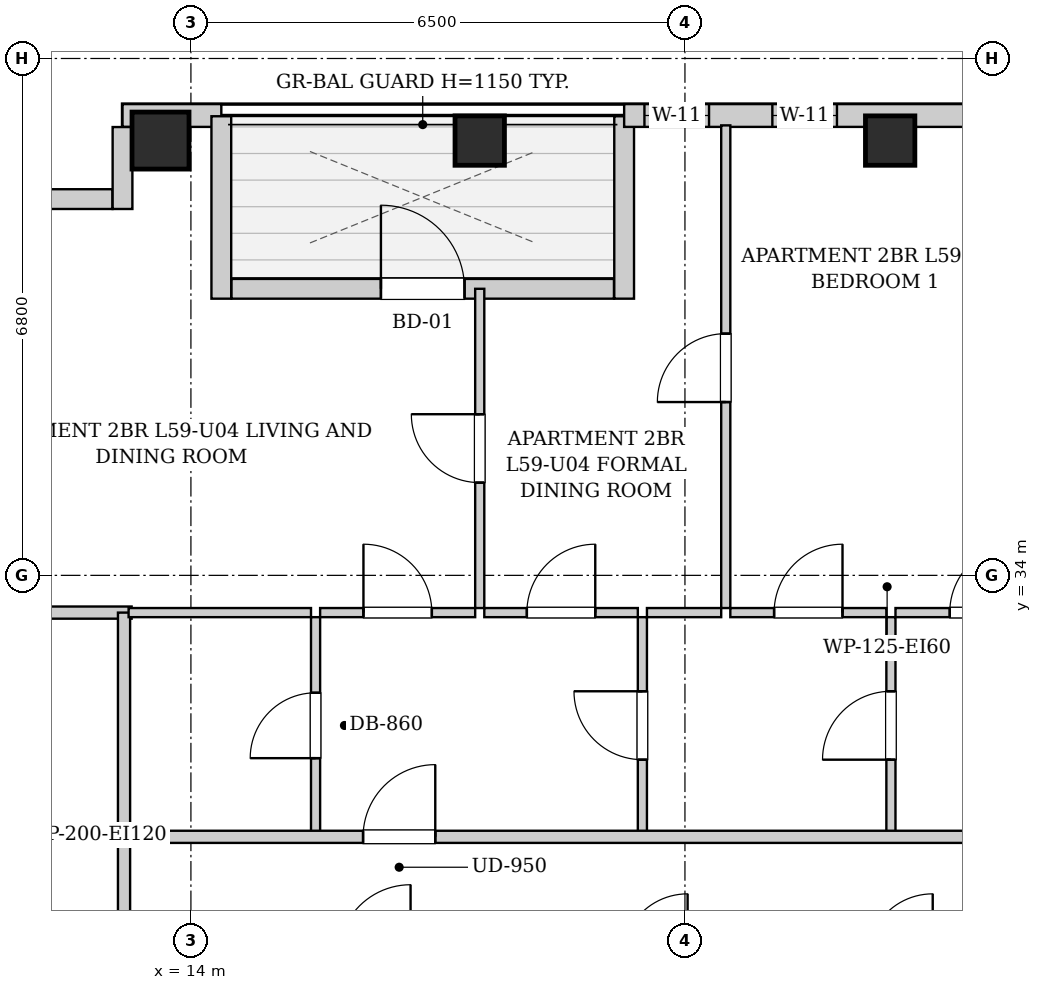
"""IFC4 building model, lengths in metres.
Left out: names, types, materials, properties, quantities, classifications, styles, units other than length and angle.
Written with IfcOpenShell. Run it as: python <this file> out.ifc"""

import sys

from ifc_helpers import new_model, si_unit, direction, frame, frame_2d, origin, origin_2d, place, context, subcontext, project, spatial, rectangle, extrude, element, fill, save


model = new_model("IFC4")
c1 = context("Model", 3, precision=1e-05, world=origin(), true_north=direction((0.0, 1.0)))
c2 = subcontext(c1, "Body", "Model", "MODEL_VIEW")
j1 = project(units=[si_unit("LENGTHUNIT", "METRE"), si_unit("PLANEANGLEUNIT", "RADIAN")], contexts=[c1])
p1 = place(None, origin())
s1 = spatial("IfcSite", under=j1, at=p1, CompositionType="ELEMENT")
p2 = place(p1, origin())
s2 = spatial("IfcBuilding", under=s1, at=p2, CompositionType="ELEMENT")
p3 = place(p2, frame((0.0, 0.0, 204.1)))
s3 = spatial("IfcBuildingStorey", under=s2, at=p3, CompositionType="ELEMENT", Elevation=204.1)
p4 = place(p3, frame((13.6, 39.72, 0.0), z_axis=(0.0, 0.0, 1.0), x_axis=(1.0, 0.0, 0.0)))
e1 = element("IfcColumn", 1, at=p4, inside=s3, PredefinedType="COLUMN", context=c2, shape_type="SweptSolid", body=[
    extrude(rectangle(XDim=0.75, YDim=0.75, at=origin_2d()), origin(), (0.0, 0.0, 1.0), 3.3),
])
for number, where, z_axis, x_axis in (
    (2, (17.8, 39.72, 0.0), (0.0, 0.0, 1.0), (1.0, 0.0, 0.0)),
    (3, (23.2, 39.72, 0.0), (0.0, 0.0, 1.0), (1.0, 0.0, 0.0)),
):
    element("IfcColumn", number, at=place(p3, frame(where, z_axis=z_axis, x_axis=x_axis)), inside=s3, PredefinedType="COLUMN", context=c2, shape_type="SweptSolid", body=[
        extrude(rectangle(XDim=0.65, YDim=0.65, at=origin_2d()), origin(), (0.0, 0.0, 1.0), 3.3),
    ])
p5 = place(p3, frame((13.1, 40.05, 0.0), z_axis=(0.0, 0.0, 1.0), x_axis=(1.0, 0.0, 0.0)))
e4 = element("IfcWall", 4, at=p5, inside=s3, PredefinedType="SOLIDWALL", context=c2, shape_type="SweptSolid", body=[
    extrude(rectangle(XDim=1.3, YDim=0.3, at=frame_2d((0.65, 0.0))), origin(), (0.0, 0.0, 1.0), 3.04),
])
p6 = place(p3, frame((14.4, 40.04, 0.0), z_axis=(0.0, 0.0, 1.0), x_axis=(0.0, -1.0, 0.0)))
e5 = element("IfcWall", 5, at=p6, inside=s3, PredefinedType="SOLIDWALL", context=c2, shape_type="SweptSolid", body=[
    extrude(rectangle(XDim=2.4, YDim=0.26, at=frame_2d((1.2, 0.0))), origin(), (0.0, 0.0, 1.0), 3.04),
])
p7 = place(p3, frame((14.534, 37.77, 0.0), z_axis=(0.0, 0.0, 1.0), x_axis=(1.0, 0.0, 0.0)))
e6 = element("IfcWall", 6, at=p7, inside=s3, PredefinedType="SOLIDWALL", context=c2, shape_type="SweptSolid", body=[
    extrude(rectangle(XDim=5.032, YDim=0.26, at=frame_2d((2.516, 0.0))), origin(), (0.0, 0.0, 1.0), 3.04),
])
p8 = place(p7, frame((1.966, 0.0, 0.0)))
e7 = element("IfcOpeningElement", 7, at=p8, cuts=e6, PredefinedType="OPENING", context=c2, shape_type="SweptSolid", body=[
    extrude(rectangle(XDim=1.1, YDim=2.0, at=frame_2d((0.55, 1.0))), frame((0.0, 0.14, 0.0), z_axis=(0.0, -1.0, 0.0), x_axis=(1.0, 0.0, 0.0)), (0.0, 0.0, 1.0), 0.28),
])
p9 = place(p3, frame((19.7, 37.64, 0.0), z_axis=(0.0, 0.0, 1.0), x_axis=(0.0, 1.0, 0.0)))
e8 = element("IfcWall", 8, at=p9, inside=s3, PredefinedType="SOLIDWALL", context=c2, shape_type="SweptSolid", body=[
    extrude(rectangle(XDim=2.4, YDim=0.26, at=frame_2d((1.2, 0.0))), origin(), (0.0, 0.0, 1.0), 3.04),
])
p10 = place(p3, frame((19.7, 40.05, 0.0), z_axis=(0.0, 0.0, 1.0), x_axis=(1.0, 0.0, 0.0)))
e9 = element("IfcWall", 9, at=p10, inside=s3, PredefinedType="SOLIDWALL", context=c2, shape_type="SweptSolid", body=[
    extrude(rectangle(XDim=11.55, YDim=0.3, at=frame_2d((5.775, 0.0))), origin(), (0.0, 0.0, 1.0), 3.04),
])
p11 = place(p10, frame((0.267, 0.0, 0.55)))
e10 = element("IfcOpeningElement", 10, at=p11, cuts=e9, PredefinedType="OPENING", context=c2, shape_type="SweptSolid", body=[
    extrude(rectangle(XDim=0.85, YDim=1.2, at=frame_2d((0.425, 0.6))), frame((0.0, 0.16, 0.0), z_axis=(0.0, -1.0, 0.0), x_axis=(1.0, 0.0, 0.0)), (0.0, 0.0, 1.0), 0.32),
])
p12 = place(p10, frame((1.95, 0.0, 0.55)))
e11 = element("IfcOpeningElement", 11, at=p12, cuts=e9, PredefinedType="OPENING", context=c2, shape_type="SweptSolid", body=[
    extrude(rectangle(XDim=0.85, YDim=1.2, at=frame_2d((0.425, 0.6))), frame((0.0, 0.16, 0.0), z_axis=(0.0, -1.0, 0.0), x_axis=(1.0, 0.0, 0.0)), (0.0, 0.0, 1.0), 0.32),
])
p13 = place(p10, frame((7.8, 0.0, 0.55)))
e12 = element("IfcOpeningElement", 12, at=p13, cuts=e9, PredefinedType="OPENING", context=c2, shape_type="SweptSolid", body=[
    extrude(rectangle(XDim=1.35, YDim=1.2, at=frame_2d((0.675, 0.6))), frame((0.0, 0.16, 0.0), z_axis=(0.0, -1.0, 0.0), x_axis=(1.0, 0.0, 0.0)), (0.0, 0.0, 1.0), 0.32),
])
p14 = place(p3, frame((11.982, 38.95, 0.0), z_axis=(0.0, 0.0, 1.0), x_axis=(1.0, 0.0, 0.0)))
e13 = element("IfcWall", 13, at=p14, inside=s3, PredefinedType="SOLIDWALL", context=c2, shape_type="SweptSolid", body=[
    extrude(rectangle(XDim=0.986, YDim=0.26, at=frame_2d((0.493, 0.0))), origin(), (0.0, 0.0, 1.0), 3.04),
])
p15 = place(p3, frame((13.1, 38.82, 0.0), z_axis=(0.0, 0.0, 1.0), x_axis=(0.0, 1.0, 0.0)))
e14 = element("IfcWall", 14, at=p15, inside=s3, PredefinedType="SOLIDWALL", context=c2, shape_type="SweptSolid", body=[
    extrude(rectangle(XDim=1.078, YDim=0.26, at=frame_2d((0.539, 0.0))), origin(), (0.0, 0.0, 1.0), 3.04),
])
p16 = place(p3, frame((13.12, 28.98, 0.0), z_axis=(0.0, 0.0, 1.0), x_axis=(0.0, 1.0, 0.0)))
e15 = element("IfcWall", 15, at=p16, inside=s3, PredefinedType="PARTITIONING", context=c2, shape_type="SweptSolid", body=[
    extrude(rectangle(XDim=1.58, YDim=0.16, at=frame_2d((0.79, 0.0))), origin(), (0.0, 0.0, 1.0), 3.04),
])
p17 = place(p3, frame((10.88, 33.51, 0.0), z_axis=(0.0, 0.0, 1.0), x_axis=(1.0, 0.0, 0.0)))
e16 = element("IfcWall", 16, at=p17, inside=s3, PredefinedType="PARTITIONING", context=c2, shape_type="SweptSolid", body=[
    extrude(rectangle(XDim=2.34, YDim=0.16, at=frame_2d((1.17, 0.0))), origin(), (0.0, 0.0, 1.0), 3.04),
])
p18 = place(p3, frame((13.12, 30.6, 0.0), z_axis=(0.0, 0.0, 1.0), x_axis=(0.0, 1.0, 0.0)))
e17 = element("IfcWall", 17, at=p18, inside=s3, PredefinedType="PARTITIONING", context=c2, shape_type="SweptSolid", body=[
    extrude(rectangle(XDim=2.91, YDim=0.16, at=frame_2d((1.455, 0.0))), origin(), (0.0, 0.0, 1.0), 3.04),
])
p19 = place(p3, frame((15.64, 30.6, 0.0), z_axis=(0.0, 0.0, 1.0), x_axis=(0.0, 1.0, 0.0)))
e18 = element("IfcWall", 18, at=p19, inside=s3, PredefinedType="PARTITIONING", context=c2, shape_type="SweptSolid", body=[
    extrude(rectangle(XDim=2.85, YDim=0.12, at=frame_2d((1.425, 0.0))), origin(), (0.0, 0.0, 1.0), 3.04),
])
p20 = place(p19, frame((0.995, 0.0, 0.0)))
e19 = element("IfcOpeningElement", 19, at=p20, cuts=e18, PredefinedType="OPENING", context=c2, shape_type="SweptSolid", body=[
    extrude(rectangle(XDim=0.86, YDim=2.05, at=frame_2d((0.43, 1.025))), frame((0.0, 0.07, 0.0), z_axis=(0.0, -1.0, 0.0), x_axis=(1.0, 0.0, 0.0)), (0.0, 0.0, 1.0), 0.14),
])
p21 = place(p3, frame((13.18, 33.51, 0.0), z_axis=(0.0, 0.0, 1.0), x_axis=(1.0, 0.0, 0.0)))
e20 = element("IfcWall", 20, at=p21, inside=s3, PredefinedType="PARTITIONING", context=c2, shape_type="SweptSolid", body=[
    extrude(rectangle(XDim=2.4, YDim=0.12, at=frame_2d((1.2, 0.0))), origin(), (0.0, 0.0, 1.0), 3.04),
])
p22 = place(p3, frame((19.94, 30.6, 0.0), z_axis=(0.0, 0.0, 1.0), x_axis=(0.0, 1.0, 0.0)))
e21 = element("IfcWall", 21, at=p22, inside=s3, PredefinedType="PARTITIONING", context=c2, shape_type="SweptSolid", body=[
    extrude(rectangle(XDim=2.85, YDim=0.12, at=frame_2d((1.425, 0.0))), origin(), (0.0, 0.0, 1.0), 3.04),
])
p23 = place(p22, frame((0.975, 0.0, 0.0)))
e22 = element("IfcOpeningElement", 22, at=p23, cuts=e21, PredefinedType="OPENING", context=c2, shape_type="SweptSolid", body=[
    extrude(rectangle(XDim=0.9, YDim=2.05, at=frame_2d((0.45, 1.025))), frame((0.0, 0.07, 0.0), z_axis=(0.0, -1.0, 0.0), x_axis=(1.0, 0.0, 0.0)), (0.0, 0.0, 1.0), 0.14),
])
p24 = place(p3, frame((15.7, 33.51, 0.0), z_axis=(0.0, 0.0, 1.0), x_axis=(1.0, 0.0, 0.0)))
e23 = element("IfcWall", 23, at=p24, inside=s3, PredefinedType="PARTITIONING", context=c2, shape_type="SweptSolid", body=[
    extrude(rectangle(XDim=2.04, YDim=0.12, at=frame_2d((1.02, 0.0))), origin(), (0.0, 0.0, 1.0), 3.04),
])
p25 = place(p24, frame((0.57, 0.0, 0.0)))
e24 = element("IfcOpeningElement", 24, at=p25, cuts=e23, PredefinedType="OPENING", context=c2, shape_type="SweptSolid", body=[
    extrude(rectangle(XDim=0.9, YDim=2.05, at=frame_2d((0.45, 1.025))), frame((0.0, 0.07, 0.0), z_axis=(0.0, -1.0, 0.0), x_axis=(1.0, 0.0, 0.0)), (0.0, 0.0, 1.0), 0.14),
])
p26 = place(p3, frame((17.86, 33.51, 0.0), z_axis=(0.0, 0.0, 1.0), x_axis=(1.0, 0.0, 0.0)))
e25 = element("IfcWall", 25, at=p26, inside=s3, PredefinedType="PARTITIONING", context=c2, shape_type="SweptSolid", body=[
    extrude(rectangle(XDim=2.02, YDim=0.12, at=frame_2d((1.01, 0.0))), origin(), (0.0, 0.0, 1.0), 3.04),
])
p27 = place(p26, frame((0.56, 0.0, 0.0)))
e26 = element("IfcOpeningElement", 26, at=p27, cuts=e25, PredefinedType="OPENING", context=c2, shape_type="SweptSolid", body=[
    extrude(rectangle(XDim=0.9, YDim=2.05, at=frame_2d((0.45, 1.025))), frame((0.0, 0.07, 0.0), z_axis=(0.0, -1.0, 0.0), x_axis=(1.0, 0.0, 0.0)), (0.0, 0.0, 1.0), 0.14),
])
p28 = place(p3, frame((23.21, 30.6, 0.0), z_axis=(0.0, 0.0, 1.0), x_axis=(0.0, 1.0, 0.0)))
e27 = element("IfcWall", 27, at=p28, inside=s3, PredefinedType="PARTITIONING", context=c2, shape_type="SweptSolid", body=[
    extrude(rectangle(XDim=2.85, YDim=0.12, at=frame_2d((1.425, 0.0))), origin(), (0.0, 0.0, 1.0), 3.04),
])
p29 = place(p28, frame((0.975, 0.0, 0.0)))
e28 = element("IfcOpeningElement", 28, at=p29, cuts=e27, PredefinedType="OPENING", context=c2, shape_type="SweptSolid", body=[
    extrude(rectangle(XDim=0.9, YDim=2.05, at=frame_2d((0.45, 1.025))), frame((0.0, 0.07, 0.0), z_axis=(0.0, -1.0, 0.0), x_axis=(1.0, 0.0, 0.0)), (0.0, 0.0, 1.0), 0.14),
])
p30 = place(p3, frame((20.0, 33.51, 0.0), z_axis=(0.0, 0.0, 1.0), x_axis=(1.0, 0.0, 0.0)))
e29 = element("IfcWall", 29, at=p30, inside=s3, PredefinedType="PARTITIONING", context=c2, shape_type="SweptSolid", body=[
    extrude(rectangle(XDim=0.977, YDim=0.12, at=frame_2d((0.489, 0.0))), origin(), (0.0, 0.0, 1.0), 3.04),
])
p31 = place(p3, frame((21.097, 33.51, 0.0), z_axis=(0.0, 0.0, 1.0), x_axis=(1.0, 0.0, 0.0)))
e30 = element("IfcWall", 30, at=p31, inside=s3, PredefinedType="PARTITIONING", context=c2, shape_type="SweptSolid", body=[
    extrude(rectangle(XDim=2.053, YDim=0.12, at=frame_2d((1.026, 0.0))), origin(), (0.0, 0.0, 1.0), 3.04),
])
p32 = place(p31, frame((0.576, 0.0, 0.0)))
e31 = element("IfcOpeningElement", 31, at=p32, cuts=e30, PredefinedType="OPENING", context=c2, shape_type="SweptSolid", body=[
    extrude(rectangle(XDim=0.9, YDim=2.05, at=frame_2d((0.45, 1.025))), frame((0.0, 0.07, 0.0), z_axis=(0.0, -1.0, 0.0), x_axis=(1.0, 0.0, 0.0)), (0.0, 0.0, 1.0), 0.14),
])
p33 = place(p3, frame((23.27, 33.51, 0.0), z_axis=(0.0, 0.0, 1.0), x_axis=(1.0, 0.0, 0.0)))
e32 = element("IfcWall", 32, at=p33, inside=s3, PredefinedType="PARTITIONING", context=c2, shape_type="SweptSolid", body=[
    extrude(rectangle(XDim=2.327, YDim=0.12, at=frame_2d((1.164, 0.0))), origin(), (0.0, 0.0, 1.0), 3.04),
])
p34 = place(p33, frame((0.714, 0.0, 0.0)))
e33 = element("IfcOpeningElement", 33, at=p34, cuts=e32, PredefinedType="OPENING", context=c2, shape_type="SweptSolid", body=[
    extrude(rectangle(XDim=0.9, YDim=2.05, at=frame_2d((0.45, 1.025))), frame((0.0, 0.07, 0.0), z_axis=(0.0, -1.0, 0.0), x_axis=(1.0, 0.0, 0.0)), (0.0, 0.0, 1.0), 0.14),
])
p35 = place(p3, frame((17.8, 33.57, 0.0), z_axis=(0.0, 0.0, 1.0), x_axis=(0.0, 1.0, 0.0)))
e34 = element("IfcWall", 34, at=p35, inside=s3, PredefinedType="PARTITIONING", context=c2, shape_type="SweptSolid", body=[
    extrude(rectangle(XDim=4.2, YDim=0.12, at=frame_2d((2.1, 0.0))), origin(), (0.0, 0.0, 1.0), 2.556),
])
p36 = place(p35, frame((1.65, 0.0, 0.0)))
e35 = element("IfcOpeningElement", 35, at=p36, cuts=e34, PredefinedType="OPENING", context=c2, shape_type="SweptSolid", body=[
    extrude(rectangle(XDim=0.9, YDim=2.05, at=frame_2d((0.45, 1.025))), frame((0.0, 0.07, 0.0), z_axis=(0.0, -1.0, 0.0), x_axis=(1.0, 0.0, 0.0)), (0.0, 0.0, 1.0), 0.14),
])
p37 = place(p3, frame((21.037, 33.57, 0.0), z_axis=(0.0, 0.0, 1.0), x_axis=(0.0, 1.0, 0.0)))
e36 = element("IfcWall", 36, at=p37, inside=s3, PredefinedType="PARTITIONING", context=c2, shape_type="SweptSolid", body=[
    extrude(rectangle(XDim=6.35, YDim=0.12, at=frame_2d((3.175, 0.0))), origin(), (0.0, 0.0, 1.0), 3.04),
])
p38 = place(p37, frame((2.71, 0.0, 0.0)))
e37 = element("IfcOpeningElement", 37, at=p38, cuts=e36, PredefinedType="OPENING", context=c2, shape_type="SweptSolid", body=[
    extrude(rectangle(XDim=0.9, YDim=2.05, at=frame_2d((0.45, 1.025))), frame((0.0, 0.07, 0.0), z_axis=(0.0, -1.0, 0.0), x_axis=(1.0, 0.0, 0.0)), (0.0, 0.0, 1.0), 0.14),
])
p39 = place(p3, frame((13.15, 30.56, 0.0), z_axis=(0.0, 0.0, 1.0), x_axis=(1.0, 0.0, 0.0)))
e38 = element("IfcWall", 38, at=p39, inside=s3, PredefinedType="PARTITIONING", context=c2, shape_type="SweptSolid", body=[
    extrude(rectangle(XDim=24.6, YDim=0.16, at=frame_2d((12.3, 0.0))), origin(), (0.0, 0.0, 1.0), 3.04),
])
p40 = place(p39, frame((3.115, 0.0, 0.0)))
e39 = element("IfcOpeningElement", 39, at=p40, cuts=e38, PredefinedType="OPENING", context=c2, shape_type="SweptSolid", body=[
    extrude(rectangle(XDim=0.95, YDim=2.1, at=frame_2d((0.475, 1.05))), frame((0.0, 0.09, 0.0), z_axis=(0.0, -1.0, 0.0), x_axis=(1.0, 0.0, 0.0)), (0.0, 0.0, 1.0), 0.18),
])
p41 = place(p39, frame((21.55, 0.0, 0.0)))
e40 = element("IfcOpeningElement", 40, at=p41, cuts=e38, PredefinedType="OPENING", context=c2, shape_type="SweptSolid", body=[
    extrude(rectangle(XDim=0.95, YDim=2.1, at=frame_2d((0.475, 1.05))), frame((0.0, 0.09, 0.0), z_axis=(0.0, -1.0, 0.0), x_axis=(1.0, 0.0, 0.0)), (0.0, 0.0, 1.0), 0.18),
])
p42 = place(p20, origin())
e41 = element("IfcDoor", 41, at=p42, inside=s3, OperationType="SINGLE_SWING_LEFT", PredefinedType="DOOR", context=c2, shape_type="SweptSolid", body=[
    extrude(rectangle(XDim=0.86, YDim=2.05, at=frame_2d((0.43, 1.025))), frame((0.0, 0.025, 0.0), z_axis=(0.0, -1.0, 0.0), x_axis=(1.0, 0.0, 0.0)), (0.0, 0.0, 1.0), 0.05),
])
fill(e19, e41)
p43 = place(p23, origin())
e42 = element("IfcDoor", 42, at=p43, inside=s3, OperationType="SINGLE_SWING_RIGHT", PredefinedType="DOOR", context=c2, shape_type="SweptSolid", body=[
    extrude(rectangle(XDim=0.9, YDim=2.05, at=frame_2d((0.45, 1.025))), frame((0.0, 0.025, 0.0), z_axis=(0.0, -1.0, 0.0), x_axis=(1.0, 0.0, 0.0)), (0.0, 0.0, 1.0), 0.05),
])
fill(e22, e42)
p44 = place(p25, origin())
e43 = element("IfcDoor", 43, at=p44, inside=s3, OperationType="SINGLE_SWING_LEFT", PredefinedType="DOOR", context=c2, shape_type="SweptSolid", body=[
    extrude(rectangle(XDim=0.9, YDim=2.05, at=frame_2d((0.45, 1.025))), frame((0.0, 0.025, 0.0), z_axis=(0.0, -1.0, 0.0), x_axis=(1.0, 0.0, 0.0)), (0.0, 0.0, 1.0), 0.05),
])
fill(e24, e43)
p45 = place(p27, origin())
e44 = element("IfcDoor", 44, at=p45, inside=s3, OperationType="SINGLE_SWING_RIGHT", PredefinedType="DOOR", context=c2, shape_type="SweptSolid", body=[
    extrude(rectangle(XDim=0.9, YDim=2.05, at=frame_2d((0.45, 1.025))), frame((0.0, 0.025, 0.0), z_axis=(0.0, -1.0, 0.0), x_axis=(1.0, 0.0, 0.0)), (0.0, 0.0, 1.0), 0.05),
])
fill(e26, e44)
p46 = place(p29, origin())
e45 = element("IfcDoor", 45, at=p46, inside=s3, OperationType="SINGLE_SWING_LEFT", PredefinedType="DOOR", context=c2, shape_type="SweptSolid", body=[
    extrude(rectangle(XDim=0.9, YDim=2.05, at=frame_2d((0.45, 1.025))), frame((0.0, 0.025, 0.0), z_axis=(0.0, -1.0, 0.0), x_axis=(1.0, 0.0, 0.0)), (0.0, 0.0, 1.0), 0.05),
])
fill(e28, e45)
p47 = place(p32, origin())
e46 = element("IfcDoor", 46, at=p47, inside=s3, OperationType="SINGLE_SWING_RIGHT", PredefinedType="DOOR", context=c2, shape_type="SweptSolid", body=[
    extrude(rectangle(XDim=0.9, YDim=2.05, at=frame_2d((0.45, 1.025))), frame((0.0, 0.025, 0.0), z_axis=(0.0, -1.0, 0.0), x_axis=(1.0, 0.0, 0.0)), (0.0, 0.0, 1.0), 0.05),
])
fill(e31, e46)
p48 = place(p34, origin())
e47 = element("IfcDoor", 47, at=p48, inside=s3, OperationType="SINGLE_SWING_RIGHT", PredefinedType="DOOR", context=c2, shape_type="SweptSolid", body=[
    extrude(rectangle(XDim=0.9, YDim=2.05, at=frame_2d((0.45, 1.025))), frame((0.0, 0.025, 0.0), z_axis=(0.0, -1.0, 0.0), x_axis=(1.0, 0.0, 0.0)), (0.0, 0.0, 1.0), 0.05),
])
fill(e33, e47)
p49 = place(p36, origin())
e48 = element("IfcDoor", 48, at=p49, inside=s3, OperationType="SINGLE_SWING_RIGHT", PredefinedType="DOOR", context=c2, shape_type="SweptSolid", body=[
    extrude(rectangle(XDim=0.9, YDim=2.05, at=frame_2d((0.45, 1.025))), frame((0.0, 0.025, 0.0), z_axis=(0.0, -1.0, 0.0), x_axis=(1.0, 0.0, 0.0)), (0.0, 0.0, 1.0), 0.05),
])
fill(e35, e48)
p50 = place(p38, origin())
e49 = element("IfcDoor", 49, at=p50, inside=s3, OperationType="SINGLE_SWING_LEFT", PredefinedType="DOOR", context=c2, shape_type="SweptSolid", body=[
    extrude(rectangle(XDim=0.9, YDim=2.05, at=frame_2d((0.45, 1.025))), frame((0.0, 0.025, 0.0), z_axis=(0.0, -1.0, 0.0), x_axis=(1.0, 0.0, 0.0)), (0.0, 0.0, 1.0), 0.05),
])
fill(e37, e49)
p51 = place(p40, origin())
e50 = element("IfcDoor", 50, at=p51, inside=s3, OperationType="SINGLE_SWING_RIGHT", PredefinedType="DOOR", context=c2, shape_type="SweptSolid", body=[
    extrude(rectangle(XDim=0.95, YDim=2.1, at=frame_2d((0.475, 1.05))), frame((0.0, 0.025, 0.0), z_axis=(0.0, -1.0, 0.0), x_axis=(1.0, 0.0, 0.0)), (0.0, 0.0, 1.0), 0.05),
])
fill(e39, e50)
p52 = place(p8, origin())
e51 = element("IfcDoor", 51, at=p52, inside=s3, OperationType="SINGLE_SWING_LEFT", PredefinedType="DOOR", context=c2, shape_type="SweptSolid", body=[
    extrude(rectangle(XDim=1.1, YDim=2.0, at=frame_2d((0.55, 1.0))), frame((0.0, 0.025, 0.0), z_axis=(0.0, -1.0, 0.0), x_axis=(1.0, 0.0, 0.0)), (0.0, 0.0, 1.0), 0.05),
])
fill(e7, e51)
p53 = place(p11, origin())
e52 = element("IfcWindow", 52, at=p53, inside=s3, PartitioningType="SINGLE_PANEL", PredefinedType="WINDOW", context=c2, shape_type="SweptSolid", body=[
    extrude(rectangle(XDim=0.85, YDim=1.2, at=frame_2d((0.425, 0.6))), frame((0.0, 0.03, 0.0), z_axis=(0.0, -1.0, 0.0), x_axis=(1.0, 0.0, 0.0)), (0.0, 0.0, 1.0), 0.06),
])
fill(e10, e52)
p54 = place(p12, origin())
e53 = element("IfcWindow", 53, at=p54, inside=s3, PartitioningType="SINGLE_PANEL", PredefinedType="WINDOW", context=c2, shape_type="SweptSolid", body=[
    extrude(rectangle(XDim=0.85, YDim=1.2, at=frame_2d((0.425, 0.6))), frame((0.0, 0.03, 0.0), z_axis=(0.0, -1.0, 0.0), x_axis=(1.0, 0.0, 0.0)), (0.0, 0.0, 1.0), 0.06),
])
fill(e11, e53)
save(model, sys.argv[1])
